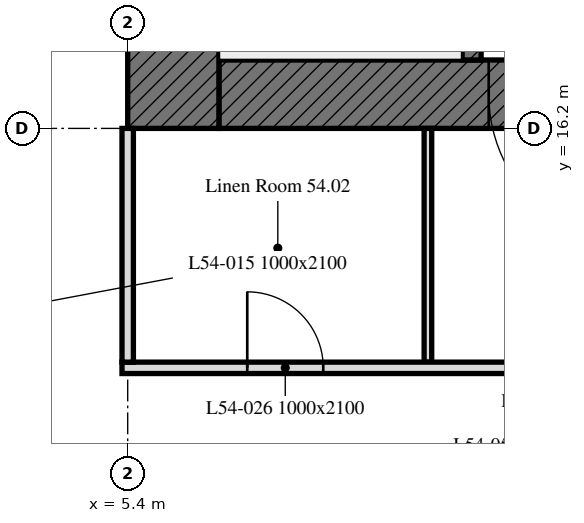
"""IFC4 building model, lengths in metres.
Left out: names, types, materials, properties, quantities, classifications, styles, units other than length and angle.
Written with IfcOpenShell. Run it as: python <this file> out.ifc"""

import sys

from ifc_helpers import new_model, si_unit, direction, frame, frame_2d, origin, place, context, subcontext, project, spatial, rectangle, extrude, element, fill, save


model = new_model("IFC4")
c1 = context("Model", 3, precision=1e-05, world=origin(), true_north=direction((0.0, 1.0)))
c2 = subcontext(c1, "Body", "Model", "MODEL_VIEW")
j1 = project(units=[si_unit("LENGTHUNIT", "METRE"), si_unit("PLANEANGLEUNIT", "RADIAN")], contexts=[c1])
p1 = place(None, origin())
s1 = spatial("IfcSite", under=j1, at=p1, CompositionType="ELEMENT")
p2 = place(p1, origin())
s2 = spatial("IfcBuilding", under=s1, at=p2, CompositionType="ELEMENT")
p3 = place(p2, frame((0.0, 0.0, 217.0)))
s3 = spatial("IfcBuildingStorey", under=s2, at=p3, CompositionType="ELEMENT", Elevation=217.0)
p4 = place(p3, frame((17.7, 16.65, 0.0), z_axis=(0.0, 0.0, 1.0), x_axis=(-1.0, 0.0, 0.0)))
e1 = element("IfcWall", 1, at=p4, inside=s3, PredefinedType="SOLIDWALL", context=c2, shape_type="SweptSolid", body=[
    extrude(rectangle(XDim=11.1, YDim=0.9, at=frame_2d((5.55, 0.0))), origin(), (0.0, 0.0, 1.0), 3.0),
])
p5 = place(p4, frame((5.55, 0.0, 0.0)))
e2 = element("IfcOpeningElement", 2, at=p5, cuts=e1, PredefinedType="OPENING", context=c2, shape_type="SweptSolid", body=[
    extrude(rectangle(XDim=2.0, YDim=2.4, at=frame_2d((1.0, 1.2))), frame((0.0, 0.45, 0.0), z_axis=(0.0, -1.0, 0.0), x_axis=(1.0, 0.0, 0.0)), (0.0, 0.0, 1.0), 0.9),
])
p6 = place(p3, frame((6.0, 16.2, 0.0), z_axis=(0.0, 0.0, 1.0), x_axis=(0.0, 1.0, 0.0)))
e3 = element("IfcWall", 3, at=p6, inside=s3, PredefinedType="SOLIDWALL", context=c2, shape_type="SweptSolid", body=[
    extrude(rectangle(XDim=16.2, YDim=1.2, at=frame_2d((8.1, 0.0))), origin(), (0.0, 0.0, 1.0), 3.0),
])
p7 = place(p3, frame((9.925, 17.1, 0.0), z_axis=(0.0, 0.0, 1.0), x_axis=(0.0, 1.0, 0.0)))
e4 = element("IfcWall", 4, at=p7, inside=s3, PredefinedType="SOLIDWALL", context=c2, shape_type="SweptSolid", body=[
    extrude(rectangle(XDim=14.4, YDim=0.25, at=frame_2d((7.2, 0.0))), origin(), (0.0, 0.0, 1.0), 3.0),
])
p8 = place(p7, frame((4.6, 0.0, 0.0)))
e5 = element("IfcOpeningElement", 5, at=p8, cuts=e4, PredefinedType="OPENING", context=c2, shape_type="SweptSolid", body=[
    extrude(rectangle(XDim=1.0, YDim=2.1, at=frame_2d((0.5, 1.05))), frame((0.0, 0.125, 0.0), z_axis=(0.0, -1.0, 0.0), x_axis=(1.0, 0.0, 0.0)), (0.0, 0.0, 1.0), 0.25),
])
p9 = place(p7, frame((7.062, 0.0, 0.0)))
e6 = element("IfcOpeningElement", 6, at=p9, cuts=e4, PredefinedType="OPENING", context=c2, shape_type="SweptSolid", body=[
    extrude(rectangle(XDim=1.2, YDim=2.1, at=frame_2d((0.6, 1.05))), frame((0.0, 0.125, 0.0), z_axis=(0.0, -1.0, 0.0), x_axis=(1.0, 0.0, 0.0)), (0.0, 0.0, 1.0), 0.25),
])
p10 = place(p7, frame((9.472, 0.0, 0.0)))
e7 = element("IfcOpeningElement", 7, at=p10, cuts=e4, PredefinedType="OPENING", context=c2, shape_type="SweptSolid", body=[
    extrude(rectangle(XDim=0.9, YDim=2.1, at=frame_2d((0.45, 1.05))), frame((0.0, 0.125, 0.0), z_axis=(0.0, -1.0, 0.0), x_axis=(1.0, 0.0, 0.0)), (0.0, 0.0, 1.0), 0.25),
])
p11 = place(p7, frame((11.159, 0.0, 0.0)))
e8 = element("IfcOpeningElement", 8, at=p11, cuts=e4, PredefinedType="OPENING", context=c2, shape_type="SweptSolid", body=[
    extrude(rectangle(XDim=0.9, YDim=2.1, at=frame_2d((0.45, 1.05))), frame((0.0, 0.125, 0.0), z_axis=(0.0, -1.0, 0.0), x_axis=(1.0, 0.0, 0.0)), (0.0, 0.0, 1.0), 0.25),
])
p12 = place(p7, frame((13.1, 0.0, 0.0)))
e9 = element("IfcOpeningElement", 9, at=p12, cuts=e4, PredefinedType="OPENING", context=c2, shape_type="SweptSolid", body=[
    extrude(rectangle(XDim=0.9, YDim=2.1, at=frame_2d((0.45, 1.05))), frame((0.0, 0.125, 0.0), z_axis=(0.0, -1.0, 0.0), x_axis=(1.0, 0.0, 0.0)), (0.0, 0.0, 1.0), 0.25),
])
p13 = place(p3, frame((9.35, 16.2, 0.0), z_axis=(0.0, 0.0, 1.0), x_axis=(0.0, -1.0, 0.0)))
e10 = element("IfcWall", 10, at=p13, inside=s3, PredefinedType="PARTITIONING", context=c2, shape_type="SweptSolid", body=[
    extrude(rectangle(XDim=3.075, YDim=0.1, at=frame_2d((1.538, 0.0))), origin(), (0.0, 0.0, 1.0), 3.0),
])
p14 = place(p3, frame((5.325, 13.05, 0.0), z_axis=(0.0, 0.0, 1.0), x_axis=(1.0, 0.0, 0.0)))
e11 = element("IfcWall", 11, at=p14, inside=s3, PredefinedType="PARTITIONING", context=c2, shape_type="SweptSolid", body=[
    extrude(rectangle(XDim=37.124, YDim=0.15, at=frame_2d((18.562, 0.0))), origin(), (0.0, 0.0, 1.0), 3.0),
])
p15 = place(p14, frame((23.875, 0.0, 0.0)))
e12 = element("IfcOpeningElement", 12, at=p15, cuts=e11, PredefinedType="OPENING", context=c2, shape_type="SweptSolid", body=[
    extrude(rectangle(XDim=1.0, YDim=2.1, at=frame_2d((0.5, 1.05))), frame((0.0, 0.075, 0.0), z_axis=(0.0, -1.0, 0.0), x_axis=(1.0, 0.0, 0.0)), (0.0, 0.0, 1.0), 0.15),
])
p16 = place(p14, frame((13.475, 0.0, 0.0)))
e13 = element("IfcOpeningElement", 13, at=p16, cuts=e11, PredefinedType="OPENING", context=c2, shape_type="SweptSolid", body=[
    extrude(rectangle(XDim=1.0, YDim=2.1, at=frame_2d((0.5, 1.05))), frame((0.0, 0.075, 0.0), z_axis=(0.0, -1.0, 0.0), x_axis=(1.0, 0.0, 0.0)), (0.0, 0.0, 1.0), 0.15),
])
p17 = place(p14, frame((34.095, 0.0, 0.0)))
e14 = element("IfcOpeningElement", 14, at=p17, cuts=e11, PredefinedType="OPENING", context=c2, shape_type="SweptSolid", body=[
    extrude(rectangle(XDim=1.0, YDim=2.1, at=frame_2d((0.5, 1.05))), frame((0.0, 0.075, 0.0), z_axis=(0.0, -1.0, 0.0), x_axis=(1.0, 0.0, 0.0)), (0.0, 0.0, 1.0), 0.15),
])
p18 = place(p14, frame((8.337, 0.0, 0.0)))
e15 = element("IfcOpeningElement", 15, at=p18, cuts=e11, PredefinedType="OPENING", context=c2, shape_type="SweptSolid", body=[
    extrude(rectangle(XDim=1.0, YDim=2.1, at=frame_2d((0.5, 1.05))), frame((0.0, 0.075, 0.0), z_axis=(0.0, -1.0, 0.0), x_axis=(1.0, 0.0, 0.0)), (0.0, 0.0, 1.0), 0.15),
])
p19 = place(p14, frame((1.648, 0.0, 0.0)))
e16 = element("IfcOpeningElement", 16, at=p19, cuts=e11, PredefinedType="OPENING", context=c2, shape_type="SweptSolid", body=[
    extrude(rectangle(XDim=1.0, YDim=2.1, at=frame_2d((0.5, 1.05))), frame((0.0, 0.075, 0.0), z_axis=(0.0, -1.0, 0.0), x_axis=(1.0, 0.0, 0.0)), (0.0, 0.0, 1.0), 0.15),
])
p20 = place(p14, frame((28.613, 0.0, 0.0)))
e17 = element("IfcOpeningElement", 17, at=p20, cuts=e11, PredefinedType="OPENING", context=c2, shape_type="SweptSolid", body=[
    extrude(rectangle(XDim=1.0, YDim=2.1, at=frame_2d((0.5, 1.05))), frame((0.0, 0.075, 0.0), z_axis=(0.0, -1.0, 0.0), x_axis=(1.0, 0.0, 0.0)), (0.0, 0.0, 1.0), 0.15),
])
p21 = place(p14, frame((30.625, 0.0, 0.0)))
e18 = element("IfcOpeningElement", 18, at=p21, cuts=e11, PredefinedType="OPENING", context=c2, shape_type="SweptSolid", body=[
    extrude(rectangle(XDim=1.8, YDim=2.4, at=frame_2d((0.9, 1.2))), frame((0.0, 0.075, 0.0), z_axis=(0.0, -1.0, 0.0), x_axis=(1.0, 0.0, 0.0)), (0.0, 0.0, 1.0), 0.15),
])
p22 = place(p14, frame((5.525, 0.0, 0.0)))
e19 = element("IfcOpeningElement", 19, at=p22, cuts=e11, PredefinedType="OPENING", context=c2, shape_type="SweptSolid", body=[
    extrude(rectangle(XDim=1.8, YDim=2.4, at=frame_2d((0.9, 1.2))), frame((0.0, 0.075, 0.0), z_axis=(0.0, -1.0, 0.0), x_axis=(1.0, 0.0, 0.0)), (0.0, 0.0, 1.0), 0.15),
])
p23 = place(p3, frame((5.4, 13.125, 0.0), z_axis=(0.0, 0.0, 1.0), x_axis=(0.0, 1.0, 0.0)))
e20 = element("IfcWall", 20, at=p23, inside=s3, PredefinedType="PARTITIONING", context=c2, shape_type="SweptSolid", body=[
    extrude(rectangle(XDim=3.075, YDim=0.15, at=frame_2d((1.538, 0.0))), origin(), (0.0, 0.0, 1.0), 3.0),
])
p24 = place(p5, origin())
e21 = element("IfcDoor", 21, at=p24, inside=s3, OperationType="DOUBLE_DOOR_SINGLE_SWING", PredefinedType="DOOR", context=c2, shape_type="SweptSolid", body=[
    extrude(rectangle(XDim=2.0, YDim=2.4, at=frame_2d((1.0, 1.2))), frame((0.0, 0.025, 0.0), z_axis=(0.0, -1.0, 0.0), x_axis=(1.0, 0.0, 0.0)), (0.0, 0.0, 1.0), 0.05),
])
fill(e2, e21)
p25 = place(p19, origin())
e22 = element("IfcDoor", 22, at=p25, inside=s3, OperationType="SINGLE_SWING_RIGHT", PredefinedType="DOOR", context=c2, shape_type="SweptSolid", body=[
    extrude(rectangle(XDim=1.0, YDim=2.1, at=frame_2d((0.5, 1.05))), frame((0.0, 0.025, 0.0), z_axis=(0.0, -1.0, 0.0), x_axis=(1.0, 0.0, 0.0)), (0.0, 0.0, 1.0), 0.05),
])
fill(e16, e22)
save(model, sys.argv[1])
